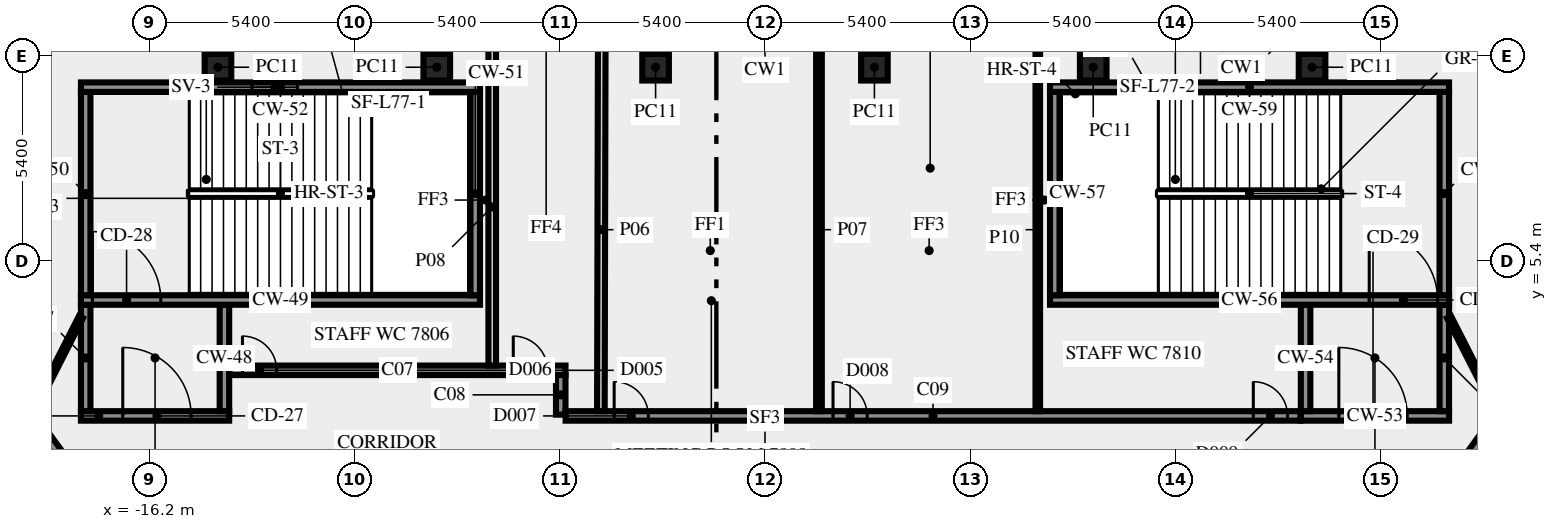
"""IFC4 building model, lengths in metres.
Left out: names, types, materials, properties, quantities, classifications, styles, units other than length and angle.
Written with IfcOpenShell. Run it as: python <this file> out.ifc"""

import sys

from ifc_helpers import new_model, si_unit, direction, frame, frame_2d, origin, origin_2d, place, context, subcontext, project, spatial, rectangle, extrude, element, fill, save


model = new_model("IFC4")
c1 = context("Model", 3, precision=1e-05, world=origin(), true_north=direction((0.0, 1.0)))
c2 = subcontext(c1, "Body", "Model", "MODEL_VIEW")
j1 = project(units=[si_unit("LENGTHUNIT", "METRE"), si_unit("PLANEANGLEUNIT", "RADIAN")], contexts=[c1])
p1 = place(None, origin())
s1 = spatial("IfcSite", under=j1, at=p1, CompositionType="ELEMENT")
p2 = place(p1, origin())
s2 = spatial("IfcBuilding", under=s1, at=p2, CompositionType="ELEMENT")
p3 = place(p2, frame((0.0, 0.0, 335.0)))
s3 = spatial("IfcBuildingStorey", under=s2, at=p3, CompositionType="ELEMENT", Elevation=335.0)
for number, where, z_axis, x_axis in (
    (1, (14.395, 10.5, 0.0), (0.0, 0.0, 1.0), (-1.0, 0.0, 0.0)),
    (2, (8.637, 10.5, 0.0), (0.0, 0.0, 1.0), (-1.0, 0.0, 0.0)),
    (3, (2.879, 10.5, 0.0), (0.0, 0.0, 1.0), (-1.0, 0.0, 0.0)),
    (4, (-2.879, 10.5, 0.0), (0.0, 0.0, 1.0), (-1.0, 0.0, 0.0)),
    (5, (-8.637, 10.5, 0.0), (0.0, 0.0, 1.0), (-1.0, 0.0, 0.0)),
    (6, (-14.395, 10.5, 0.0), (0.0, 0.0, 1.0), (-1.0, 0.0, 0.0)),
):
    element("IfcColumn", number, at=place(p3, frame(where, z_axis=z_axis, x_axis=x_axis)), inside=s3, PredefinedType="COLUMN", context=c2, shape_type="SweptSolid", body=[
        extrude(rectangle(XDim=0.7, YDim=0.7, at=origin_2d()), origin(), (0.0, 0.0, 1.0), 3.65),
    ])
p4 = place(p3, frame((-18.0, 1.325, 0.0), z_axis=(0.0, 0.0, 1.0), x_axis=(1.0, 0.0, 0.0)))
e7 = element("IfcWall", 7, at=p4, inside=s3, PredefinedType="SHEAR", context=c2, shape_type="SweptSolid", body=[
    extrude(rectangle(XDim=3.9, YDim=0.25, at=frame_2d((1.95, 0.0))), origin(), (0.0, 0.0, 1.0), 3.65),
])
p5 = place(p4, frame((1.1, 0.0, 0.0)))
e8 = element("IfcOpeningElement", 8, at=p5, cuts=e7, PredefinedType="OPENING", context=c2, shape_type="SweptSolid", body=[
    extrude(rectangle(XDim=1.8, YDim=2.1, at=frame_2d((0.9, 1.05))), frame((0.0, 0.135, 0.0), z_axis=(0.0, -1.0, 0.0), x_axis=(1.0, 0.0, 0.0)), (0.0, 0.0, 1.0), 0.27),
])
for number, where, z_axis, x_axis in (
    (9, (-17.875, 1.45, 0.0), (0.0, 0.0, 1.0), (0.0, 1.0, 0.0)),
    (10, (-14.225, 1.45, 0.0), (0.0, 0.0, 1.0), (0.0, 1.0, 0.0)),
):
    element("IfcWall", number, at=place(p3, frame(where, z_axis=z_axis, x_axis=x_axis)), inside=s3, PredefinedType="SHEAR", context=c2, shape_type="SweptSolid", body=[
        extrude(rectangle(XDim=2.8, YDim=0.25, at=frame_2d((1.4, 0.0))), origin(), (0.0, 0.0, 1.0), 3.65),
    ])
p6 = place(p3, frame((-18.0, 4.375, 0.0), z_axis=(0.0, 0.0, 1.0), x_axis=(1.0, 0.0, 0.0)))
e11 = element("IfcWall", 11, at=p6, inside=s3, PredefinedType="SHEAR", context=c2, shape_type="SweptSolid", body=[
    extrude(rectangle(XDim=10.5, YDim=0.25, at=frame_2d((5.25, 0.0))), origin(), (0.0, 0.0, 1.0), 3.65),
])
p7 = place(p6, frame((0.3, 0.0, 0.0)))
e12 = element("IfcOpeningElement", 12, at=p7, cuts=e11, PredefinedType="OPENING", context=c2, shape_type="SweptSolid", body=[
    extrude(rectangle(XDim=1.8, YDim=2.1, at=frame_2d((0.9, 1.05))), frame((0.0, 0.135, 0.0), z_axis=(0.0, -1.0, 0.0), x_axis=(1.0, 0.0, 0.0)), (0.0, 0.0, 1.0), 0.27),
])
for number, where, z_axis, x_axis in (
    (13, (-17.875, 4.5, 0.0), (0.0, 0.0, 1.0), (0.0, 1.0, 0.0)),
    (14, (-7.625, 4.5, 0.0), (0.0, 0.0, 1.0), (0.0, 1.0, 0.0)),
):
    element("IfcWall", number, at=place(p3, frame(where, z_axis=z_axis, x_axis=x_axis)), inside=s3, PredefinedType="SHEAR", context=c2, shape_type="SweptSolid", body=[
        extrude(rectangle(XDim=5.35, YDim=0.25, at=frame_2d((2.675, 0.0))), origin(), (0.0, 0.0, 1.0), 3.65),
    ])
p8 = place(p3, frame((-18.0, 9.975, 0.0), z_axis=(0.0, 0.0, 1.0), x_axis=(1.0, 0.0, 0.0)))
e15 = element("IfcWall", 15, at=p8, inside=s3, PredefinedType="SHEAR", context=c2, shape_type="SweptSolid", body=[
    extrude(rectangle(XDim=10.5, YDim=0.25, at=frame_2d((5.25, 0.0))), origin(), (0.0, 0.0, 1.0), 3.65),
])
p9 = place(p8, frame((4.5, 0.0, 1.0)))
e16 = element("IfcOpeningElement", 16, at=p9, cuts=e15, PredefinedType="OPENING", context=c2, shape_type="SweptSolid", body=[
    extrude(rectangle(XDim=1.2, YDim=1.2, at=frame_2d((0.6, 0.6))), frame((0.0, 0.135, 0.0), z_axis=(0.0, -1.0, 0.0), x_axis=(1.0, 0.0, 0.0)), (0.0, 0.0, 1.0), 0.27),
])
p10 = place(p3, frame((14.1, 1.325, 0.0), z_axis=(0.0, 0.0, 1.0), x_axis=(1.0, 0.0, 0.0)))
e17 = element("IfcWall", 17, at=p10, inside=s3, PredefinedType="SHEAR", context=c2, shape_type="SweptSolid", body=[
    extrude(rectangle(XDim=3.9, YDim=0.25, at=frame_2d((1.95, 0.0))), origin(), (0.0, 0.0, 1.0), 3.65),
])
p11 = place(p10, frame((1.0, 0.0, 0.0)))
e18 = element("IfcOpeningElement", 18, at=p11, cuts=e17, PredefinedType="OPENING", context=c2, shape_type="SweptSolid", body=[
    extrude(rectangle(XDim=1.8, YDim=2.1, at=frame_2d((0.9, 1.05))), frame((0.0, 0.135, 0.0), z_axis=(0.0, -1.0, 0.0), x_axis=(1.0, 0.0, 0.0)), (0.0, 0.0, 1.0), 0.27),
])
for number, where, z_axis, x_axis in (
    (19, (14.225, 1.45, 0.0), (0.0, 0.0, 1.0), (0.0, 1.0, 0.0)),
    (20, (17.875, 1.45, 0.0), (0.0, 0.0, 1.0), (0.0, 1.0, 0.0)),
):
    element("IfcWall", number, at=place(p3, frame(where, z_axis=z_axis, x_axis=x_axis)), inside=s3, PredefinedType="SHEAR", context=c2, shape_type="SweptSolid", body=[
        extrude(rectangle(XDim=2.8, YDim=0.25, at=frame_2d((1.4, 0.0))), origin(), (0.0, 0.0, 1.0), 3.65),
    ])
p12 = place(p3, frame((7.5, 4.375, 0.0), z_axis=(0.0, 0.0, 1.0), x_axis=(1.0, 0.0, 0.0)))
e21 = element("IfcWall", 21, at=p12, inside=s3, PredefinedType="SHEAR", context=c2, shape_type="SweptSolid", body=[
    extrude(rectangle(XDim=10.5, YDim=0.25, at=frame_2d((5.25, 0.0))), origin(), (0.0, 0.0, 1.0), 3.65),
])
p13 = place(p12, frame((8.4, 0.0, 0.0)))
e22 = element("IfcOpeningElement", 22, at=p13, cuts=e21, PredefinedType="OPENING", context=c2, shape_type="SweptSolid", body=[
    extrude(rectangle(XDim=1.8, YDim=2.1, at=frame_2d((0.9, 1.05))), frame((0.0, 0.135, 0.0), z_axis=(0.0, -1.0, 0.0), x_axis=(1.0, 0.0, 0.0)), (0.0, 0.0, 1.0), 0.27),
])
for number, where, z_axis, x_axis in (
    (23, (7.625, 4.5, 0.0), (0.0, 0.0, 1.0), (0.0, 1.0, 0.0)),
    (24, (17.875, 4.5, 0.0), (0.0, 0.0, 1.0), (0.0, 1.0, 0.0)),
):
    element("IfcWall", number, at=place(p3, frame(where, z_axis=z_axis, x_axis=x_axis)), inside=s3, PredefinedType="SHEAR", context=c2, shape_type="SweptSolid", body=[
        extrude(rectangle(XDim=5.35, YDim=0.25, at=frame_2d((2.675, 0.0))), origin(), (0.0, 0.0, 1.0), 3.65),
    ])
p14 = place(p3, frame((7.5, 9.975, 0.0), z_axis=(0.0, 0.0, 1.0), x_axis=(1.0, 0.0, 0.0)))
e25 = element("IfcWall", 25, at=p14, inside=s3, PredefinedType="SHEAR", context=c2, shape_type="SweptSolid", body=[
    extrude(rectangle(XDim=10.5, YDim=0.25, at=frame_2d((5.25, 0.0))), origin(), (0.0, 0.0, 1.0), 3.65),
])
p15 = place(p14, frame((2.0, 0.0, 1.0)))
e26 = element("IfcOpeningElement", 26, at=p15, cuts=e25, PredefinedType="OPENING", context=c2, shape_type="SweptSolid", body=[
    extrude(rectangle(XDim=1.2, YDim=1.2, at=frame_2d((0.6, 0.6))), frame((0.0, 0.135, 0.0), z_axis=(0.0, -1.0, 0.0), x_axis=(1.0, 0.0, 0.0)), (0.0, 0.0, 1.0), 0.27),
])
p16 = place(p3, frame((17.545, -1.125, 0.0), z_axis=(0.0, 0.0, 1.0), x_axis=(0.58779555165, 0.809009511354, 0.0)))
e27 = element("IfcWall", 27, at=p16, inside=s3, PredefinedType="SOLIDWALL", context=c2, shape_type="SweptSolid", body=[
    extrude(rectangle(XDim=18.103, YDim=0.25, at=frame_2d((9.052, 0.0))), origin(), (0.0, 0.0, 1.0), 3.65),
])
p17 = place(p16, frame((16.728, 0.0, 0.0)))
e28 = element("IfcOpeningElement", 28, at=p17, cuts=e27, PredefinedType="OPENING", context=c2, shape_type="SweptSolid", body=[
    extrude(rectangle(XDim=0.9, YDim=2.1, at=frame_2d((0.45, 1.05))), frame((0.0, 0.135, 0.0), z_axis=(0.0, -1.0, 0.0), x_axis=(1.0, 0.0, 0.0)), (0.0, 0.0, 1.0), 0.27),
])
p18 = place(p3, frame((-28.039, 13.319, 0.0), z_axis=(0.0, 0.0, 1.0), x_axis=(0.587791911753, -0.809012155952, 0.0)))
e29 = element("IfcWall", 29, at=p18, inside=s3, PredefinedType="SOLIDWALL", context=c2, shape_type="SweptSolid", body=[
    extrude(rectangle(XDim=17.853, YDim=0.25, at=frame_2d((8.927, 0.0))), origin(), (0.0, 0.0, 1.0), 3.65),
])
p19 = place(p18, frame((0.225, 0.0, 0.0)))
e30 = element("IfcOpeningElement", 30, at=p19, cuts=e29, PredefinedType="OPENING", context=c2, shape_type="SweptSolid", body=[
    extrude(rectangle(XDim=0.9, YDim=2.1, at=frame_2d((0.45, 1.05))), frame((0.0, 0.135, 0.0), z_axis=(0.0, -1.0, 0.0), x_axis=(1.0, 0.0, 0.0)), (0.0, 0.0, 1.0), 0.27),
])
p20 = place(p3, frame((-14.09, 2.525, 0.0), z_axis=(0.0, 0.0, 1.0), x_axis=(1.0, 0.0, 0.0)))
e31 = element("IfcWall", 31, at=p20, inside=s3, PredefinedType="SOLIDWALL", context=c2, shape_type="SweptSolid", body=[
    extrude(rectangle(XDim=8.84, YDim=0.25, at=frame_2d((4.42, 0.0))), origin(), (0.0, 0.0, 1.0), 3.65),
])
p21 = place(p20, frame((7.466, 0.0, 0.0)))
e32 = element("IfcOpeningElement", 32, at=p21, cuts=e31, PredefinedType="OPENING", context=c2, shape_type="SweptSolid", body=[
    extrude(rectangle(XDim=0.9, YDim=2.1, at=frame_2d((0.45, 1.05))), frame((0.0, 0.135, 0.0), z_axis=(0.0, -1.0, 0.0), x_axis=(1.0, 0.0, 0.0)), (0.0, 0.0, 1.0), 0.27),
])
p22 = place(p20, frame((0.34, 0.0, 0.0)))
e33 = element("IfcOpeningElement", 33, at=p22, cuts=e31, PredefinedType="OPENING", context=c2, shape_type="SweptSolid", body=[
    extrude(rectangle(XDim=0.9, YDim=2.1, at=frame_2d((0.45, 1.05))), frame((0.0, 0.135, 0.0), z_axis=(0.0, -1.0, 0.0), x_axis=(1.0, 0.0, 0.0)), (0.0, 0.0, 1.0), 0.27),
])
p23 = place(p3, frame((-5.375, 2.4, 0.0), z_axis=(0.0, 0.0, 1.0), x_axis=(0.0, -1.0, 0.0)))
e34 = element("IfcWall", 34, at=p23, inside=s3, PredefinedType="SOLIDWALL", context=c2, shape_type="SweptSolid", body=[
    extrude(rectangle(XDim=1.041, YDim=0.25, at=frame_2d((0.521, 0.0))), origin(), (0.0, 0.0, 1.0), 3.65),
])
p24 = place(p3, frame((-5.246, 1.325, 0.0), z_axis=(0.0, 0.0, 1.0), x_axis=(1.0, 0.0, 0.0)))
e35 = element("IfcWall", 35, at=p24, inside=s3, PredefinedType="SOLIDWALL", context=c2, shape_type="SweptSolid", body=[
    extrude(rectangle(XDim=19.336, YDim=0.25, at=frame_2d((9.668, 0.0))), origin(), (0.0, 0.0, 1.0), 3.65),
])
p25 = place(p24, frame((1.277, 0.0, 0.0)))
e36 = element("IfcOpeningElement", 36, at=p25, cuts=e35, PredefinedType="OPENING", context=c2, shape_type="SweptSolid", body=[
    extrude(rectangle(XDim=0.9, YDim=2.1, at=frame_2d((0.45, 1.05))), frame((0.0, 0.135, 0.0), z_axis=(0.0, -1.0, 0.0), x_axis=(1.0, 0.0, 0.0)), (0.0, 0.0, 1.0), 0.27),
])
p26 = place(p24, frame((7.036, 0.0, 0.0)))
e37 = element("IfcOpeningElement", 37, at=p26, cuts=e35, PredefinedType="OPENING", context=c2, shape_type="SweptSolid", body=[
    extrude(rectangle(XDim=0.9, YDim=2.1, at=frame_2d((0.45, 1.05))), frame((0.0, 0.135, 0.0), z_axis=(0.0, -1.0, 0.0), x_axis=(1.0, 0.0, 0.0)), (0.0, 0.0, 1.0), 0.27),
])
p27 = place(p24, frame((18.096, 0.0, 0.0)))
e38 = element("IfcOpeningElement", 38, at=p27, cuts=e35, PredefinedType="OPENING", context=c2, shape_type="SweptSolid", body=[
    extrude(rectangle(XDim=0.9, YDim=2.1, at=frame_2d((0.45, 1.05))), frame((0.0, 0.135, 0.0), z_axis=(0.0, -1.0, 0.0), x_axis=(1.0, 0.0, 0.0)), (0.0, 0.0, 1.0), 0.27),
])
p28 = place(p3, frame((-4.296, 11.0, 0.0), z_axis=(0.0, 0.0, 1.0), x_axis=(-0.002377476217, -0.999997173799, 0.0)))
e39 = element("IfcWall", 39, at=p28, inside=s3, PredefinedType="SOLIDWALL", context=c2, shape_type="SweptSolid", body=[
    extrude(rectangle(XDim=9.55, YDim=0.2, at=frame_2d((4.775, 0.0))), origin(), (0.0, 0.0, 1.0), 2.95),
])
p29 = place(p3, frame((1.42, 1.45, 0.0), z_axis=(0.0, 0.0, 1.0), x_axis=(0.0, 1.0, 0.0)))
e40 = element("IfcWall", 40, at=p29, inside=s3, PredefinedType="PARTITIONING", context=c2, shape_type="SweptSolid", body=[
    extrude(rectangle(XDim=9.55, YDim=0.15, at=frame_2d((4.775, 0.0))), origin(), (0.0, 0.0, 1.0), 2.95),
])
p30 = place(p3, frame((-7.178, 11.0, 0.0), z_axis=(0.0, 0.0, 1.0), x_axis=(0.0, -1.0, 0.0)))
e41 = element("IfcWall", 41, at=p30, inside=s3, PredefinedType="SOLIDWALL", context=c2, shape_type="SweptSolid", body=[
    extrude(rectangle(XDim=8.35, YDim=0.2, at=frame_2d((4.175, 0.0))), origin(), (0.0, 0.0, 1.0), 2.95),
])
p31 = place(p3, frame((7.178, 1.45, 0.0), z_axis=(0.0, 0.0, 1.0), x_axis=(0.0, 1.0, 0.0)))
e42 = element("IfcWall", 42, at=p31, inside=s3, PredefinedType="PARTITIONING", context=c2, shape_type="SweptSolid", body=[
    extrude(rectangle(XDim=9.55, YDim=0.12, at=frame_2d((4.775, 0.0))), origin(), (0.0, 0.0, 1.0), 2.95),
])
for number, where, z_axis, x_axis in (
    (43, (18.0, 3.925, 0.0), (0.0, 0.0, 1.0), (0.454, -0.891, 0.0)),
    (44, (-19.261, 1.45, 0.0), (0.0, 0.0, 1.0), (0.454, 0.891, 0.0)),
):
    element("IfcWall", number, at=place(p3, frame(where, z_axis=z_axis, x_axis=x_axis)), inside=s3, PredefinedType="PARTITIONING", context=c2, shape_type="SweptSolid", body=[
        extrude(rectangle(XDim=2.778, YDim=0.12, at=frame_2d((1.389, 0.0))), origin(), (0.0, 0.0, 1.0), 3.65),
    ])
p32 = place(p5, origin())
e45 = element("IfcDoor", 45, at=p32, inside=s3, OperationType="DOUBLE_DOOR_SINGLE_SWING", PredefinedType="DOOR", context=c2, shape_type="SweptSolid", body=[
    extrude(rectangle(XDim=1.8, YDim=2.1, at=frame_2d((0.9, 1.05))), frame((0.0, 0.025, 0.0), z_axis=(0.0, -1.0, 0.0), x_axis=(1.0, 0.0, 0.0)), (0.0, 0.0, 1.0), 0.05),
])
fill(e8, e45)
p33 = place(p7, origin())
e46 = element("IfcDoor", 46, at=p33, inside=s3, OperationType="DOUBLE_DOOR_SINGLE_SWING", PredefinedType="DOOR", context=c2, shape_type="SweptSolid", body=[
    extrude(rectangle(XDim=1.8, YDim=2.1, at=frame_2d((0.9, 1.05))), frame((0.0, 0.025, 0.0), z_axis=(0.0, -1.0, 0.0), x_axis=(1.0, 0.0, 0.0)), (0.0, 0.0, 1.0), 0.05),
])
fill(e12, e46)
p34 = place(p9, origin())
e47 = element("IfcWindow", 47, at=p34, inside=s3, PartitioningType="SINGLE_PANEL", PredefinedType="WINDOW", context=c2, shape_type="SweptSolid", body=[
    extrude(rectangle(XDim=1.2, YDim=1.2, at=frame_2d((0.6, 0.6))), frame((0.0, 0.03, 0.0), z_axis=(0.0, -1.0, 0.0), x_axis=(1.0, 0.0, 0.0)), (0.0, 0.0, 1.0), 0.06),
])
fill(e16, e47)
p35 = place(p11, origin())
e48 = element("IfcDoor", 48, at=p35, inside=s3, OperationType="DOUBLE_DOOR_SINGLE_SWING", PredefinedType="DOOR", context=c2, shape_type="SweptSolid", body=[
    extrude(rectangle(XDim=1.8, YDim=2.1, at=frame_2d((0.9, 1.05))), frame((0.0, 0.025, 0.0), z_axis=(0.0, -1.0, 0.0), x_axis=(1.0, 0.0, 0.0)), (0.0, 0.0, 1.0), 0.05),
])
fill(e18, e48)
p36 = place(p13, origin())
e49 = element("IfcDoor", 49, at=p36, inside=s3, OperationType="DOUBLE_DOOR_SINGLE_SWING", PredefinedType="DOOR", context=c2, shape_type="SweptSolid", body=[
    extrude(rectangle(XDim=1.8, YDim=2.1, at=frame_2d((0.9, 1.05))), frame((0.0, 0.025, 0.0), z_axis=(0.0, -1.0, 0.0), x_axis=(1.0, 0.0, 0.0)), (0.0, 0.0, 1.0), 0.05),
])
fill(e22, e49)
p37 = place(p15, origin())
e50 = element("IfcWindow", 50, at=p37, inside=s3, PartitioningType="SINGLE_PANEL", PredefinedType="WINDOW", context=c2, shape_type="SweptSolid", body=[
    extrude(rectangle(XDim=1.2, YDim=1.2, at=frame_2d((0.6, 0.6))), frame((0.0, 0.03, 0.0), z_axis=(0.0, -1.0, 0.0), x_axis=(1.0, 0.0, 0.0)), (0.0, 0.0, 1.0), 0.06),
])
fill(e26, e50)
p38 = place(p25, origin())
e51 = element("IfcDoor", 51, at=p38, inside=s3, OperationType="SINGLE_SWING_LEFT", PredefinedType="DOOR", context=c2, shape_type="SweptSolid", body=[
    extrude(rectangle(XDim=0.9, YDim=2.1, at=frame_2d((0.45, 1.05))), frame((0.0, 0.025, 0.0), z_axis=(0.0, -1.0, 0.0), x_axis=(1.0, 0.0, 0.0)), (0.0, 0.0, 1.0), 0.05),
])
fill(e36, e51)
p39 = place(p21, origin())
e52 = element("IfcDoor", 52, at=p39, inside=s3, OperationType="SINGLE_SWING_RIGHT", PredefinedType="DOOR", context=c2, shape_type="SweptSolid", body=[
    extrude(rectangle(XDim=0.9, YDim=2.1, at=frame_2d((0.45, 1.05))), frame((0.0, 0.025, 0.0), z_axis=(0.0, -1.0, 0.0), x_axis=(1.0, 0.0, 0.0)), (0.0, 0.0, 1.0), 0.05),
])
fill(e32, e52)
p40 = place(p26, origin())
e53 = element("IfcDoor", 53, at=p40, inside=s3, OperationType="SINGLE_SWING_LEFT", PredefinedType="DOOR", context=c2, shape_type="SweptSolid", body=[
    extrude(rectangle(XDim=0.9, YDim=2.1, at=frame_2d((0.45, 1.05))), frame((0.0, 0.025, 0.0), z_axis=(0.0, -1.0, 0.0), x_axis=(1.0, 0.0, 0.0)), (0.0, 0.0, 1.0), 0.05),
])
fill(e37, e53)
p41 = place(p22, origin())
e54 = element("IfcDoor", 54, at=p41, inside=s3, OperationType="SINGLE_SWING_LEFT", PredefinedType="DOOR", context=c2, shape_type="SweptSolid", body=[
    extrude(rectangle(XDim=0.9, YDim=2.1, at=frame_2d((0.45, 1.05))), frame((0.0, 0.025, 0.0), z_axis=(0.0, -1.0, 0.0), x_axis=(1.0, 0.0, 0.0)), (0.0, 0.0, 1.0), 0.05),
])
fill(e33, e54)
p42 = place(p27, origin())
e55 = element("IfcDoor", 55, at=p42, inside=s3, OperationType="SINGLE_SWING_RIGHT", PredefinedType="DOOR", context=c2, shape_type="SweptSolid", body=[
    extrude(rectangle(XDim=0.9, YDim=2.1, at=frame_2d((0.45, 1.05))), frame((0.0, 0.025, 0.0), z_axis=(0.0, -1.0, 0.0), x_axis=(1.0, 0.0, 0.0)), (0.0, 0.0, 1.0), 0.05),
])
fill(e38, e55)
save(model, sys.argv[1])
